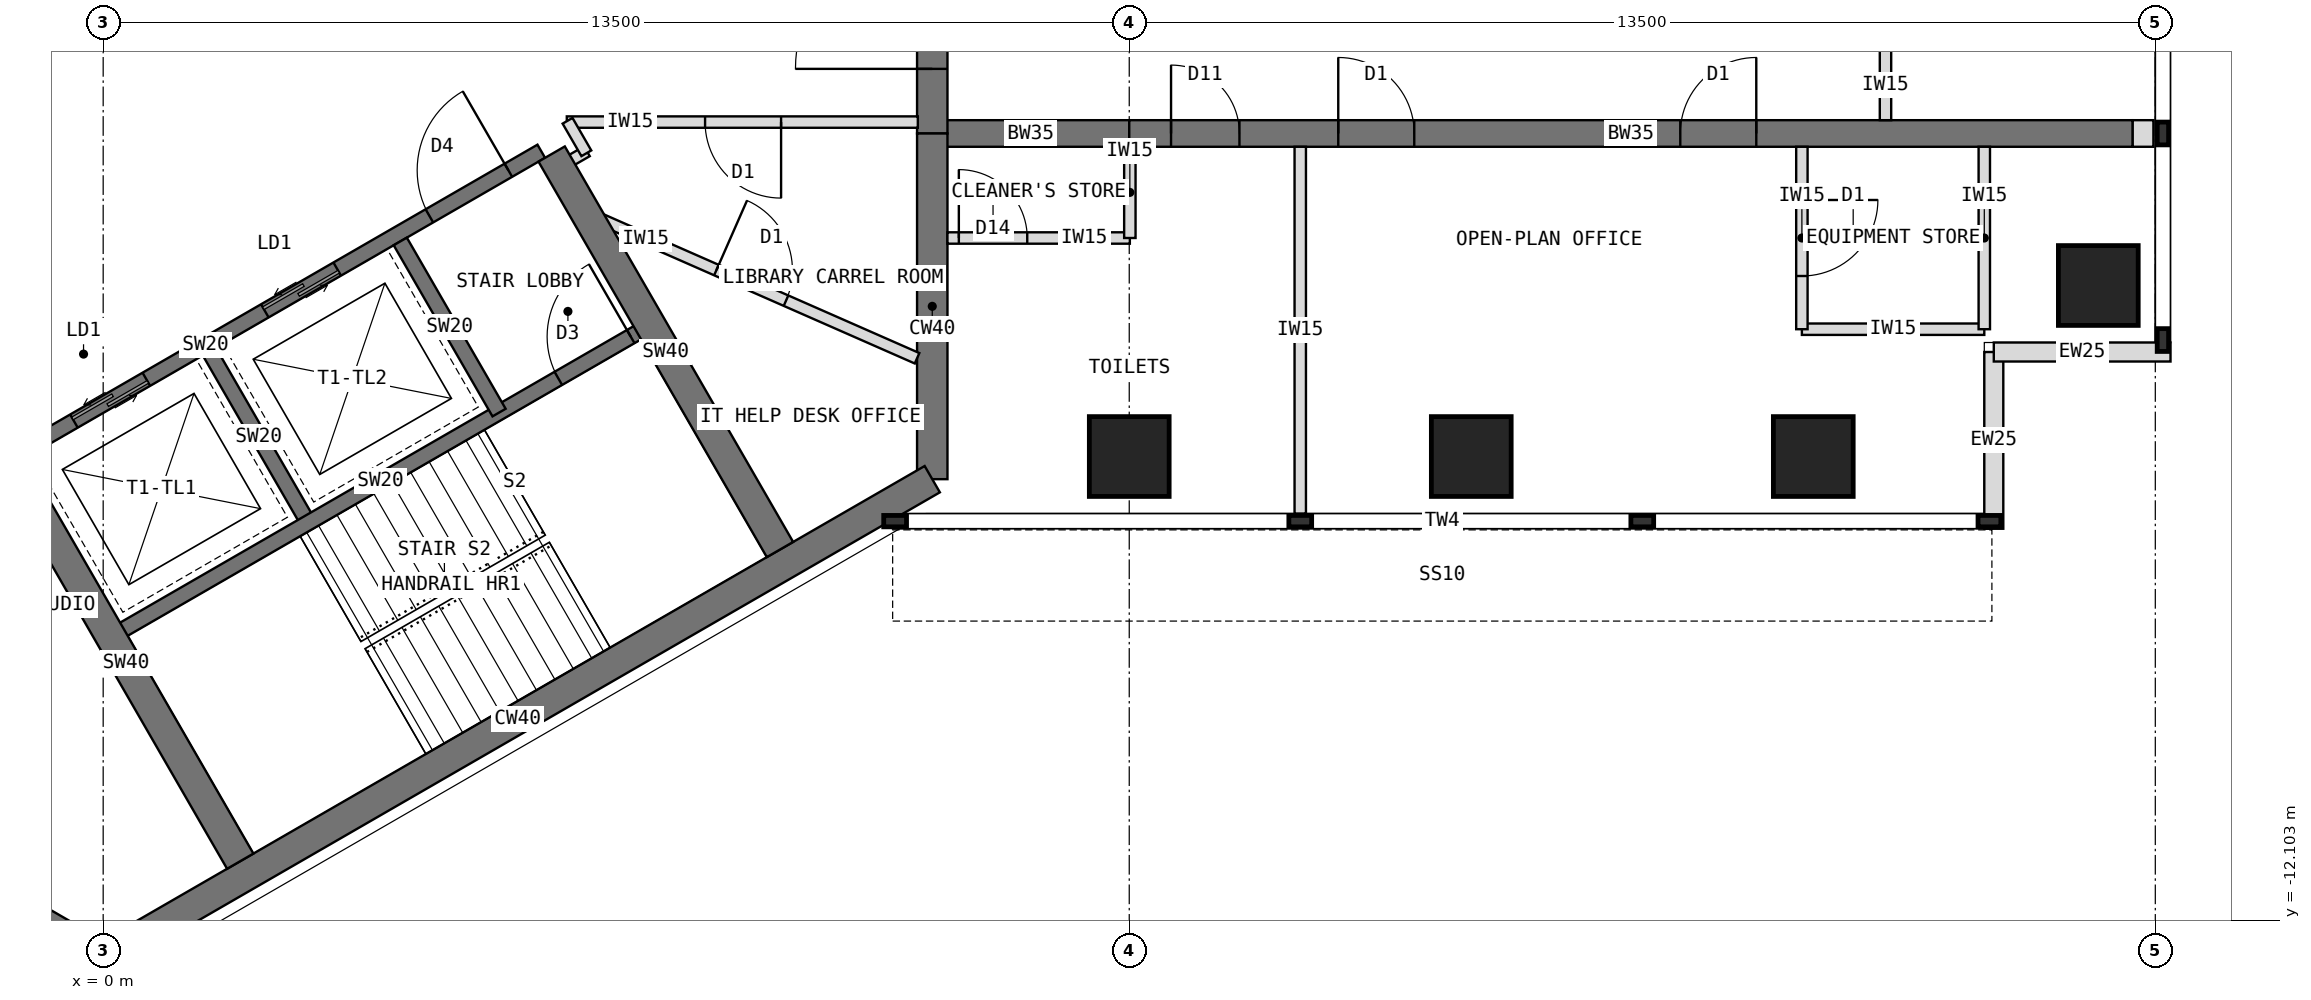
"""IFC4 building model, lengths in metres.
Left out: names, types, materials, properties, quantities, classifications, styles, units other than length and angle.
Written with IfcOpenShell. Run it as: python <this file> out.ifc"""

import sys

from ifc_helpers import new_model, si_unit, direction, frame, frame_2d, origin, origin_2d, place, context, subcontext, project, spatial, rectangle, extrude, element, fill, save


model = new_model("IFC4")
c1 = context("Model", 3, precision=1e-05, world=origin(), true_north=direction((0.0, 1.0)))
c2 = subcontext(c1, "Body", "Model", "MODEL_VIEW")
j1 = project(units=[si_unit("LENGTHUNIT", "METRE"), si_unit("PLANEANGLEUNIT", "RADIAN")], contexts=[c1])
p1 = place(None, origin())
s1 = spatial("IfcSite", under=j1, at=p1, CompositionType="ELEMENT")
p2 = place(p1, origin())
s2 = spatial("IfcBuilding", under=s1, at=p2, CompositionType="ELEMENT")
p3 = place(p2, frame((0.0, 0.0, 247.5)))
s3 = spatial("IfcBuildingStorey", under=s2, at=p3, CompositionType="ELEMENT", Elevation=247.5)
p4 = place(p3, frame((10.908, -6.298, 0.0), z_axis=(0.0, 0.0, 1.0), x_axis=(0.0, 1.0, 0.0)))
e1 = element("IfcWall", 1, at=p4, inside=s3, PredefinedType="SHEAR", context=c2, shape_type="SweptSolid", body=[
    extrude(rectangle(XDim=4.548, YDim=0.4, at=frame_2d((2.274, 0.0))), origin(), (0.0, 0.0, 1.0), 4.0),
])
p5 = place(p3, frame((10.908, -1.75, 0.0), z_axis=(0.0, 0.0, 1.0), x_axis=(0.0, 1.0, 0.0)))
e2 = element("IfcWall", 2, at=p5, inside=s3, PredefinedType="SHEAR", context=c2, shape_type="SweptSolid", body=[
    extrude(rectangle(XDim=3.5, YDim=0.4, at=frame_2d((1.75, 0.0))), origin(), (0.0, 0.0, 1.0), 4.0),
])
p6 = place(p5, frame((0.85, 0.0, 0.0)))
e3 = element("IfcOpeningElement", 3, at=p6, cuts=e2, PredefinedType="OPENING", context=c2, shape_type="SweptSolid", body=[
    extrude(rectangle(XDim=1.8, YDim=2.1, at=frame_2d((0.9, 1.05))), frame((0.0, 0.21, 0.0), z_axis=(0.0, -1.0, 0.0), x_axis=(1.0, 0.0, 0.0)), (0.0, 0.0, 1.0), 0.42),
])
p7 = place(p3, frame((-3.939, -10.322, 0.0), z_axis=(0.0, 0.0, 1.0), x_axis=(0.866011268655, -0.500024481964, 0.0)))
e4 = element("IfcWall", 4, at=p7, inside=s3, PredefinedType="SHEAR", context=c2, shape_type="SweptSolid", body=[
    extrude(rectangle(XDim=4.548, YDim=0.4, at=frame_2d((2.274, 0.0))), origin(), (0.0, 0.0, 1.0), 4.0),
])
p8 = place(p3, frame((0.0, -12.596, 0.0), z_axis=(0.0, 0.0, 1.0), x_axis=(0.866021940709, 0.500005998175, 0.0)))
e5 = element("IfcWall", 5, at=p8, inside=s3, PredefinedType="SHEAR", context=c2, shape_type="SweptSolid", body=[
    extrude(rectangle(XDim=12.596, YDim=0.4, at=frame_2d((6.298, 0.0))), origin(), (0.0, 0.0, 1.0), 4.0),
])
p9 = place(p3, frame((10.908, -1.75, 0.0), z_axis=(0.0, 0.0, 1.0), x_axis=(1.0, 0.0, 0.0)))
e6 = element("IfcWall", 6, at=p9, inside=s3, PredefinedType="SHEAR", context=c2, shape_type="SweptSolid", body=[
    extrude(rectangle(XDim=2.592, YDim=0.35, at=frame_2d((1.296, 0.0))), origin(), (0.0, 0.0, 1.0), 4.0),
])
p10 = place(p3, frame((13.5, -1.75, 0.0), z_axis=(0.0, 0.0, 1.0), x_axis=(1.0, 0.0, 0.0)))
e7 = element("IfcWall", 7, at=p10, inside=s3, PredefinedType="SHEAR", context=c2, shape_type="SweptSolid", body=[
    extrude(rectangle(XDim=13.2, YDim=0.35, at=frame_2d((6.6, 0.0))), origin(), (0.0, 0.0, 1.0), 4.0),
])
p11 = place(p10, frame((0.55, 0.0, 0.0)))
e8 = element("IfcOpeningElement", 8, at=p11, cuts=e7, PredefinedType="OPENING", context=c2, shape_type="SweptSolid", body=[
    extrude(rectangle(XDim=0.9, YDim=2.1, at=frame_2d((0.45, 1.05))), frame((0.0, 0.185, 0.0), z_axis=(0.0, -1.0, 0.0), x_axis=(1.0, 0.0, 0.0)), (0.0, 0.0, 1.0), 0.37),
])
p12 = place(p10, frame((2.75, 0.0, 0.0)))
e9 = element("IfcOpeningElement", 9, at=p12, cuts=e7, PredefinedType="OPENING", context=c2, shape_type="SweptSolid", body=[
    extrude(rectangle(XDim=1.0, YDim=2.1, at=frame_2d((0.5, 1.05))), frame((0.0, 0.185, 0.0), z_axis=(0.0, -1.0, 0.0), x_axis=(1.0, 0.0, 0.0)), (0.0, 0.0, 1.0), 0.37),
])
p13 = place(p10, frame((7.25, 0.0, 0.0)))
e10 = element("IfcOpeningElement", 10, at=p13, cuts=e7, PredefinedType="OPENING", context=c2, shape_type="SweptSolid", body=[
    extrude(rectangle(XDim=1.0, YDim=2.1, at=frame_2d((0.5, 1.05))), frame((0.0, 0.185, 0.0), z_axis=(0.0, -1.0, 0.0), x_axis=(1.0, 0.0, 0.0)), (0.0, 0.0, 1.0), 0.37),
])
for number, where, z_axis, x_axis in (
    (11, (13.5, -6.0, 0.0), (0.0, 0.0, 1.0), (1.0, 0.0, 0.0)),
    (12, (18.0, -6.0, 0.0), (0.0, 0.0, 1.0), (1.0, 0.0, 0.0)),
    (13, (22.5, -6.0, 0.0), (0.0, 0.0, 1.0), (1.0, 0.0, 0.0)),
    (14, (26.25, -3.75, 0.0), (0.0, 0.0, 1.0), (1.0, 0.0, 0.0)),
):
    element("IfcColumn", number, at=place(p3, frame(where, z_axis=z_axis, x_axis=x_axis)), inside=s3, PredefinedType="COLUMN", context=c2, shape_type="SweptSolid", body=[
        extrude(rectangle(XDim=1.05, YDim=1.05, at=origin_2d()), origin(), (0.0, 0.0, 1.0), 4.0),
    ])
for number, where, z_axis, x_axis in (
    (15, (24.875, -6.95, 0.0), (0.0, 0.0, 1.0), (0.0, 1.0, 0.0)),
    (16, (24.875, -4.625, 0.0), (0.0, 0.0, 1.0), (1.0, 0.0, 0.0)),
):
    element("IfcWall", number, at=place(p3, frame(where, z_axis=z_axis, x_axis=x_axis)), inside=s3, PredefinedType="STANDARD", context=c2, shape_type="SweptSolid", body=[
        extrude(rectangle(XDim=2.325, YDim=0.25, at=frame_2d((1.163, 0.0))), origin(), (0.0, 0.0, 1.0), 3.8),
    ])
p14 = place(p3, frame((26.7, -1.75, 0.0), z_axis=(0.0, 0.0, 1.0), x_axis=(1.0, 0.0, 0.0)))
e17 = element("IfcWall", 17, at=p14, inside=s3, PredefinedType="PARTITIONING", context=c2, shape_type="SweptSolid", body=[
    extrude(rectangle(XDim=0.275, YDim=0.35, at=frame_2d((0.138, 0.0))), origin(), (0.0, 0.0, 1.0), 3.8),
])
p15 = place(p3, frame((-1.164, -5.984, 0.0), z_axis=(0.0, 0.0, 1.0), x_axis=(0.866026010844, 0.49999894854, 0.0)))
e18 = element("IfcWall", 18, at=p15, inside=s3, PredefinedType="SHEAR", context=c2, shape_type="SweptSolid", body=[
    extrude(rectangle(XDim=8.0, YDim=0.2, at=frame_2d((4.0, 0.0))), origin(), (0.0, 0.0, 1.0), 4.0),
])
p16 = place(p15, frame((6.3, 0.0, 0.0)))
e19 = element("IfcOpeningElement", 19, at=p16, cuts=e18, PredefinedType="OPENING", context=c2, shape_type="SweptSolid", body=[
    extrude(rectangle(XDim=1.2, YDim=2.1, at=frame_2d((0.6, 1.05))), frame((0.0, 0.11, 0.0), z_axis=(0.0, -1.0, 0.0), x_axis=(1.0, 0.0, 0.0)), (0.0, 0.0, 1.0), 0.22),
])
p17 = place(p15, frame((0.9, 0.0, 0.0)))
e20 = element("IfcOpeningElement", 20, at=p17, cuts=e18, PredefinedType="OPENING", context=c2, shape_type="SweptSolid", body=[
    extrude(rectangle(XDim=1.1, YDim=2.2, at=frame_2d((0.55, 1.1))), frame((0.0, 0.11, 0.0), z_axis=(0.0, -1.0, 0.0), x_axis=(1.0, 0.0, 0.0)), (0.0, 0.0, 1.0), 0.22),
])
p18 = place(p15, frame((3.8, 0.0, 0.0)))
e21 = element("IfcOpeningElement", 21, at=p18, cuts=e18, PredefinedType="OPENING", context=c2, shape_type="SweptSolid", body=[
    extrude(rectangle(XDim=1.1, YDim=2.2, at=frame_2d((0.55, 1.1))), frame((0.0, 0.11, 0.0), z_axis=(0.0, -1.0, 0.0), x_axis=(1.0, 0.0, 0.0)), (0.0, 0.0, 1.0), 0.22),
])
p19 = place(p3, frame((1.397, -4.62, 0.0), z_axis=(0.0, 0.0, 1.0), x_axis=(0.499936506574, -0.866062058628, 0.0)))
e22 = element("IfcWall", 22, at=p19, inside=s3, PredefinedType="SHEAR", context=c2, shape_type="SweptSolid", body=[
    extrude(rectangle(XDim=2.6, YDim=0.2, at=frame_2d((1.3, 0.0))), origin(), (0.0, 0.0, 1.0), 4.0),
])
p20 = place(p3, frame((3.909, -3.17, 0.0), z_axis=(0.0, 0.0, 1.0), x_axis=(0.49997716683, -0.86603858612, 0.0)))
e23 = element("IfcWall", 23, at=p20, inside=s3, PredefinedType="SHEAR", context=c2, shape_type="SweptSolid", body=[
    extrude(rectangle(XDim=2.6, YDim=0.2, at=frame_2d((1.3, 0.0))), origin(), (0.0, 0.0, 1.0), 4.0),
])
p21 = place(p3, frame((0.186, -8.322, 0.0), z_axis=(0.0, 0.0, 1.0), x_axis=(0.866026010844, 0.49999894854, 0.0)))
e24 = element("IfcWall", 24, at=p21, inside=s3, PredefinedType="SHEAR", context=c2, shape_type="SweptSolid", body=[
    extrude(rectangle(XDim=8.0, YDim=0.2, at=frame_2d((4.0, 0.0))), origin(), (0.0, 0.0, 1.0), 4.0),
])
p22 = place(p21, frame((6.7, 0.0, 0.0)))
e25 = element("IfcOpeningElement", 25, at=p22, cuts=e24, PredefinedType="OPENING", context=c2, shape_type="SweptSolid", body=[
    extrude(rectangle(XDim=1.1, YDim=2.1, at=frame_2d((0.55, 1.05))), frame((0.0, 0.11, 0.0), z_axis=(0.0, -1.0, 0.0), x_axis=(1.0, 0.0, 0.0)), (0.0, 0.0, 1.0), 0.22),
])
for number, where, z_axis, x_axis in (
    (26, (5.901, -2.02, 0.0), (0.0, 0.0, 1.0), (0.5, -0.866, 0.0)),
    (27, (-1.201, -6.12, 0.0), (0.0, 0.0, 1.0), (0.5, -0.866, 0.0)),
):
    element("IfcWall", number, at=place(p3, frame(where, z_axis=z_axis, x_axis=x_axis)), inside=s3, PredefinedType="SHEAR", context=c2, shape_type="SweptSolid", body=[
        extrude(rectangle(XDim=6.008, YDim=0.4, at=frame_2d((3.004, 0.0))), origin(), (0.0, 0.0, 1.0), 4.0),
    ])
p23 = place(p3, frame((15.75, -1.925, 0.0), z_axis=(0.0, 0.0, 1.0), x_axis=(0.0, -1.0, 0.0)))
e28 = element("IfcWall", 28, at=p23, inside=s3, PredefinedType="PARTITIONING", context=c2, shape_type="SweptSolid", body=[
    extrude(rectangle(XDim=4.825, YDim=0.15, at=frame_2d((2.413, 0.0))), origin(), (0.0, 0.0, 1.0), 3.8),
])
p24 = place(p3, frame((22.35, -4.325, 0.0), z_axis=(0.0, 0.0, 1.0), x_axis=(1.0, 0.0, 0.0)))
e29 = element("IfcWall", 29, at=p24, inside=s3, PredefinedType="PARTITIONING", context=c2, shape_type="SweptSolid", body=[
    extrude(rectangle(XDim=2.4, YDim=0.15, at=frame_2d((1.2, 0.0))), origin(), (0.0, 0.0, 1.0), 3.8),
])
p25 = place(p3, frame((22.35, -1.925, 0.0), z_axis=(0.0, 0.0, 1.0), x_axis=(0.0, -1.0, 0.0)))
e30 = element("IfcWall", 30, at=p25, inside=s3, PredefinedType="PARTITIONING", context=c2, shape_type="SweptSolid", body=[
    extrude(rectangle(XDim=2.4, YDim=0.15, at=frame_2d((1.2, 0.0))), origin(), (0.0, 0.0, 1.0), 3.8),
])
p26 = place(p25, frame((0.7, 0.0, 0.0)))
e31 = element("IfcOpeningElement", 31, at=p26, cuts=e30, PredefinedType="OPENING", context=c2, shape_type="SweptSolid", body=[
    extrude(rectangle(XDim=1.0, YDim=2.1, at=frame_2d((0.5, 1.05))), frame((0.0, 0.085, 0.0), z_axis=(0.0, -1.0, 0.0), x_axis=(1.0, 0.0, 0.0)), (0.0, 0.0, 1.0), 0.17),
])
p27 = place(p3, frame((24.75, -1.925, 0.0), z_axis=(0.0, 0.0, 1.0), x_axis=(0.0, -1.0, 0.0)))
e32 = element("IfcWall", 32, at=p27, inside=s3, PredefinedType="PARTITIONING", context=c2, shape_type="SweptSolid", body=[
    extrude(rectangle(XDim=2.4, YDim=0.15, at=frame_2d((1.2, 0.0))), origin(), (0.0, 0.0, 1.0), 3.8),
])
p28 = place(p3, frame((11.108, -3.125, 0.0), z_axis=(0.0, 0.0, 1.0), x_axis=(1.0, 0.0, 0.0)))
e33 = element("IfcWall", 33, at=p28, inside=s3, PredefinedType="PARTITIONING", context=c2, shape_type="SweptSolid", body=[
    extrude(rectangle(XDim=2.4, YDim=0.15, at=frame_2d((1.2, 0.0))), origin(), (0.0, 0.0, 1.0), 3.8),
])
p29 = place(p28, frame((0.15, 0.0, 0.0)))
e34 = element("IfcOpeningElement", 34, at=p29, cuts=e33, PredefinedType="OPENING", context=c2, shape_type="SweptSolid", body=[
    extrude(rectangle(XDim=0.9, YDim=2.1, at=frame_2d((0.45, 1.05))), frame((0.0, 0.085, 0.0), z_axis=(0.0, -1.0, 0.0), x_axis=(1.0, 0.0, 0.0)), (0.0, 0.0, 1.0), 0.17),
])
p30 = place(p3, frame((13.508, -1.925, 0.0), z_axis=(0.0, 0.0, 1.0), x_axis=(0.0, -1.0, 0.0)))
e35 = element("IfcWall", 35, at=p30, inside=s3, PredefinedType="PARTITIONING", context=c2, shape_type="SweptSolid", body=[
    extrude(rectangle(XDim=1.2, YDim=0.15, at=frame_2d((0.6, 0.0))), origin(), (0.0, 0.0, 1.0), 3.267),
])
p31 = place(p3, frame((6.365, -1.983, 0.0), z_axis=(0.0, 0.0, 1.0), x_axis=(-0.865892400268, -0.500230298122, 0.0)))
e36 = element("IfcWall", 36, at=p31, inside=s3, PredefinedType="PARTITIONING", context=c2, shape_type="SweptSolid", body=[
    extrude(rectangle(XDim=0.43, YDim=0.15, at=frame_2d((0.215, 0.0))), origin(), (0.0, 0.0, 1.0), 3.8),
])
p32 = place(p3, frame((10.718, -1.6, 0.0), z_axis=(0.0, 0.0, 1.0), x_axis=(-1.0, 0.0, 0.0)))
e37 = element("IfcWall", 37, at=p32, inside=s3, PredefinedType="PARTITIONING", context=c2, shape_type="SweptSolid", body=[
    extrude(rectangle(XDim=4.618, YDim=0.15, at=frame_2d((2.309, 0.0))), origin(), (0.0, 0.0, 1.0), 3.8),
])
p33 = place(p32, frame((1.799, 0.0, 0.0)))
e38 = element("IfcOpeningElement", 38, at=p33, cuts=e37, PredefinedType="OPENING", context=c2, shape_type="SweptSolid", body=[
    extrude(rectangle(XDim=1.0, YDim=2.1, at=frame_2d((0.5, 1.05))), frame((0.0, 0.085, 0.0), z_axis=(0.0, -1.0, 0.0), x_axis=(1.0, 0.0, 0.0)), (0.0, 0.0, 1.0), 0.17),
])
p34 = place(p3, frame((6.11, -1.583, 0.0), z_axis=(0.0, 0.0, 1.0), x_axis=(0.50033519877, -0.865831790172, 0.0)))
e39 = element("IfcWall", 39, at=p34, inside=s3, PredefinedType="PARTITIONING", context=c2, shape_type="SweptSolid", body=[
    extrude(rectangle(XDim=0.494, YDim=0.15, at=frame_2d((0.247, 0.0))), origin(), (0.0, 0.0, 1.0), 3.8),
])
p35 = place(p3, frame((6.344, -2.789, 0.0), z_axis=(0.0, 0.0, 1.0), x_axis=(0.915438841787, -0.402457111937, 0.0)))
e40 = element("IfcWall", 40, at=p35, inside=s3, PredefinedType="PARTITIONING", context=c2, shape_type="SweptSolid", body=[
    extrude(rectangle(XDim=4.767, YDim=0.15, at=frame_2d((2.383, 0.0))), origin(), (0.0, 0.0, 1.0), 3.8),
])
p36 = place(p35, frame((1.883, 0.0, 0.0)))
e41 = element("IfcOpeningElement", 41, at=p36, cuts=e40, PredefinedType="OPENING", context=c2, shape_type="SweptSolid", body=[
    extrude(rectangle(XDim=1.0, YDim=2.1, at=frame_2d((0.5, 1.05))), frame((0.0, 0.085, 0.0), z_axis=(0.0, -1.0, 0.0), x_axis=(1.0, 0.0, 0.0)), (0.0, 0.0, 1.0), 0.17),
])
p37 = place(p3, frame((23.45, -1.575, 0.0), z_axis=(0.0, 0.0, 1.0), x_axis=(0.0, 1.0, 0.0)))
e42 = element("IfcWall", 42, at=p37, inside=s3, PredefinedType="PARTITIONING", context=c2, shape_type="SweptSolid", body=[
    extrude(rectangle(XDim=3.15, YDim=0.15, at=frame_2d((1.575, 0.0))), origin(), (0.0, 0.0, 1.0), 3.8),
])
p38 = place(p37, frame((1.075, 0.0, 0.0)))
e43 = element("IfcOpeningElement", 43, at=p38, cuts=e42, PredefinedType="OPENING", context=c2, shape_type="SweptSolid", body=[
    extrude(rectangle(XDim=1.0, YDim=2.1, at=frame_2d((0.5, 1.05))), frame((0.0, 0.085, 0.0), z_axis=(0.0, -1.0, 0.0), x_axis=(1.0, 0.0, 0.0)), (0.0, 0.0, 1.0), 0.17),
])
p39 = place(p16, origin())
e44 = element("IfcDoor", 44, at=p39, inside=s3, OperationType="SINGLE_SWING_RIGHT", PredefinedType="DOOR", context=c2, shape_type="SweptSolid", body=[
    extrude(rectangle(XDim=1.2, YDim=2.1, at=frame_2d((0.6, 1.05))), frame((0.0, 0.025, 0.0), z_axis=(0.0, -1.0, 0.0), x_axis=(1.0, 0.0, 0.0)), (0.0, 0.0, 1.0), 0.05),
])
fill(e19, e44)
p40 = place(p17, origin())
e45 = element("IfcDoor", 45, at=p40, inside=s3, OperationType="DOUBLE_DOOR_SLIDING", PredefinedType="DOOR", context=c2, shape_type="SweptSolid", body=[
    extrude(rectangle(XDim=1.1, YDim=2.2, at=frame_2d((0.55, 1.1))), frame((0.0, 0.025, 0.0), z_axis=(0.0, -1.0, 0.0), x_axis=(1.0, 0.0, 0.0)), (0.0, 0.0, 1.0), 0.05),
])
fill(e20, e45)
p41 = place(p18, origin())
e46 = element("IfcDoor", 46, at=p41, inside=s3, OperationType="DOUBLE_DOOR_SLIDING", PredefinedType="DOOR", context=c2, shape_type="SweptSolid", body=[
    extrude(rectangle(XDim=1.1, YDim=2.2, at=frame_2d((0.55, 1.1))), frame((0.0, 0.025, 0.0), z_axis=(0.0, -1.0, 0.0), x_axis=(1.0, 0.0, 0.0)), (0.0, 0.0, 1.0), 0.05),
])
fill(e21, e46)
p42 = place(p22, origin())
e47 = element("IfcDoor", 47, at=p42, inside=s3, OperationType="SINGLE_SWING_RIGHT", PredefinedType="DOOR", context=c2, shape_type="SweptSolid", body=[
    extrude(rectangle(XDim=1.1, YDim=2.1, at=frame_2d((0.55, 1.05))), frame((0.0, 0.025, 0.0), z_axis=(0.0, -1.0, 0.0), x_axis=(1.0, 0.0, 0.0)), (0.0, 0.0, 1.0), 0.05),
])
fill(e25, e47)
p43 = place(p6, origin())
e48 = element("IfcDoor", 48, at=p43, inside=s3, OperationType="DOUBLE_DOOR_DOUBLE_SWING", PredefinedType="DOOR", context=c2, shape_type="SweptSolid", body=[
    extrude(rectangle(XDim=1.8, YDim=2.1, at=frame_2d((0.9, 1.05))), frame((0.0, 0.025, 0.0), z_axis=(0.0, -1.0, 0.0), x_axis=(1.0, 0.0, 0.0)), (0.0, 0.0, 1.0), 0.05),
])
fill(e3, e48)
p44 = place(p26, origin())
e49 = element("IfcDoor", 49, at=p44, inside=s3, OperationType="SINGLE_SWING_LEFT", PredefinedType="DOOR", context=c2, shape_type="SweptSolid", body=[
    extrude(rectangle(XDim=1.0, YDim=2.1, at=frame_2d((0.5, 1.05))), frame((0.0, 0.025, 0.0), z_axis=(0.0, -1.0, 0.0), x_axis=(1.0, 0.0, 0.0)), (0.0, 0.0, 1.0), 0.05),
])
fill(e31, e49)
p45 = place(p29, origin())
e50 = element("IfcDoor", 50, at=p45, inside=s3, OperationType="SINGLE_SWING_LEFT", PredefinedType="DOOR", context=c2, shape_type="SweptSolid", body=[
    extrude(rectangle(XDim=0.9, YDim=2.1, at=frame_2d((0.45, 1.05))), frame((0.0, 0.025, 0.0), z_axis=(0.0, -1.0, 0.0), x_axis=(1.0, 0.0, 0.0)), (0.0, 0.0, 1.0), 0.05),
])
fill(e34, e50)
p46 = place(p33, origin())
e51 = element("IfcDoor", 51, at=p46, inside=s3, OperationType="SINGLE_SWING_LEFT", PredefinedType="DOOR", context=c2, shape_type="SweptSolid", body=[
    extrude(rectangle(XDim=1.0, YDim=2.1, at=frame_2d((0.5, 1.05))), frame((0.0, 0.025, 0.0), z_axis=(0.0, -1.0, 0.0), x_axis=(1.0, 0.0, 0.0)), (0.0, 0.0, 1.0), 0.05),
])
fill(e38, e51)
p47 = place(p36, origin())
e52 = element("IfcDoor", 52, at=p47, inside=s3, OperationType="SINGLE_SWING_LEFT", PredefinedType="DOOR", context=c2, shape_type="SweptSolid", body=[
    extrude(rectangle(XDim=1.0, YDim=2.1, at=frame_2d((0.5, 1.05))), frame((0.0, 0.025, 0.0), z_axis=(0.0, -1.0, 0.0), x_axis=(1.0, 0.0, 0.0)), (0.0, 0.0, 1.0), 0.05),
])
fill(e41, e52)
p48 = place(p11, origin())
e53 = element("IfcDoor", 53, at=p48, inside=s3, OperationType="SINGLE_SWING_LEFT", PredefinedType="DOOR", context=c2, shape_type="SweptSolid", body=[
    extrude(rectangle(XDim=0.9, YDim=2.1, at=frame_2d((0.45, 1.05))), frame((0.0, 0.025, 0.0), z_axis=(0.0, -1.0, 0.0), x_axis=(1.0, 0.0, 0.0)), (0.0, 0.0, 1.0), 0.05),
])
fill(e8, e53)
p49 = place(p12, origin())
e54 = element("IfcDoor", 54, at=p49, inside=s3, OperationType="SINGLE_SWING_LEFT", PredefinedType="DOOR", context=c2, shape_type="SweptSolid", body=[
    extrude(rectangle(XDim=1.0, YDim=2.1, at=frame_2d((0.5, 1.05))), frame((0.0, 0.025, 0.0), z_axis=(0.0, -1.0, 0.0), x_axis=(1.0, 0.0, 0.0)), (0.0, 0.0, 1.0), 0.05),
])
fill(e9, e54)
p50 = place(p13, origin())
e55 = element("IfcDoor", 55, at=p50, inside=s3, OperationType="SINGLE_SWING_RIGHT", PredefinedType="DOOR", context=c2, shape_type="SweptSolid", body=[
    extrude(rectangle(XDim=1.0, YDim=2.1, at=frame_2d((0.5, 1.05))), frame((0.0, 0.025, 0.0), z_axis=(0.0, -1.0, 0.0), x_axis=(1.0, 0.0, 0.0)), (0.0, 0.0, 1.0), 0.05),
])
fill(e10, e55)
save(model, sys.argv[1])
